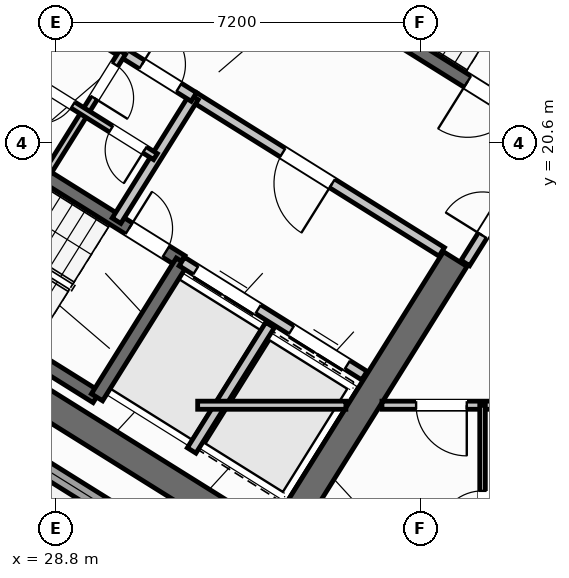
"""IFC4 building model, lengths in metres.
Left out: names, types, materials, properties, quantities, classifications, styles, units other than length and angle.
Written with IfcOpenShell. Run it as: python <this file> out.ifc"""

import sys

from ifc_helpers import new_model, si_unit, direction, frame, frame_2d, origin, place, context, subcontext, project, spatial, rectangle, extrude, source, transform, mapped, element, fill, save


model = new_model("IFC4")
c1 = context("Model", 3, precision=1e-05, world=origin(), true_north=direction((0.0, 1.0)))
c2 = subcontext(c1, "Body", "Model", "MODEL_VIEW")
j1 = project(units=[si_unit("LENGTHUNIT", "METRE"), si_unit("PLANEANGLEUNIT", "RADIAN")], contexts=[c1])
p1 = place(None, origin())
s1 = spatial("IfcSite", under=j1, at=p1, CompositionType="ELEMENT")
p2 = place(p1, origin())
s2 = spatial("IfcBuilding", under=s1, at=p2, CompositionType="ELEMENT")
p3 = place(p2, frame((0.0, 0.0, 179.4)))
s3 = spatial("IfcBuildingStorey", under=s2, at=p3, CompositionType="ELEMENT", Elevation=179.4)
p4 = place(p3, frame((33.366, 12.477, 0.0), z_axis=(0.0, 0.0, 1.0), x_axis=(-0.848047359947, 0.529920442413, 0.0)))
e1 = element("IfcWall", 1, at=p4, inside=s3, PredefinedType="SHEAR", context=c2, shape_type="SweptSolid", body=[
    extrude(rectangle(XDim=13.14, YDim=0.55, at=frame_2d((6.57, 0.0))), origin(), (0.0, 0.0, 1.0), 4.55),
])
p5 = place(p3, frame((36.683, 18.304, 0.0), z_axis=(0.0, 0.0, 1.0), x_axis=(-0.529896466841, -0.848062341122, 0.0)))
e2 = element("IfcWall", 2, at=p5, inside=s3, PredefinedType="SHEAR", context=c2, shape_type="SweptSolid", body=[
    extrude(rectangle(XDim=6.425, YDim=0.55, at=frame_2d((3.212, 0.0))), origin(), (0.0, 0.0, 1.0), 4.55),
])
p6 = place(p3, frame((31.76, 12.183, 0.0), z_axis=(0.0, 0.0, 1.0), x_axis=(-0.848047074256, 0.529920899612, 0.0)))
e3 = element("IfcWall", 3, at=p6, inside=s3, PredefinedType="STANDARD", context=c2, shape_type="SweptSolid", body=[
    extrude(rectangle(XDim=30.652, YDim=0.32, at=frame_2d((15.326, 0.0))), origin(), (0.0, 0.0, 1.0), 4.55),
])
p7 = place(p6, frame((21.52, 0.0, 0.0)))
e4 = element("IfcOpeningElement", 4, at=p7, cuts=e3, PredefinedType="OPENING", context=c2, shape_type="SweptSolid", body=[
    extrude(rectangle(XDim=1.2, YDim=2.15, at=frame_2d((0.6, 1.075))), frame((0.0, 0.17, 0.0), z_axis=(0.0, -1.0, 0.0), x_axis=(1.0, 0.0, 0.0)), (0.0, 0.0, 1.0), 0.34),
])
p8 = place(p6, frame((14.878, 0.0, 0.0)))
e5 = element("IfcOpeningElement", 5, at=p8, cuts=e3, PredefinedType="OPENING", context=c2, shape_type="SweptSolid", body=[
    extrude(rectangle(XDim=1.5, YDim=2.25, at=frame_2d((0.75, 1.125))), frame((0.0, 0.17, 0.0), z_axis=(0.0, -1.0, 0.0), x_axis=(1.0, 0.0, 0.0)), (0.0, 0.0, 1.0), 0.34),
])
p9 = place(p6, frame((1.865, 0.0, 0.75)))
e6 = element("IfcOpeningElement", 6, at=p9, cuts=e3, PredefinedType="OPENING", context=c2, shape_type="SweptSolid", body=[
    extrude(rectangle(XDim=2.4, YDim=1.6, at=frame_2d((1.2, 0.8))), frame((0.0, 0.17, 0.0), z_axis=(0.0, -1.0, 0.0), x_axis=(1.0, 0.0, 0.0)), (0.0, 0.0, 1.0), 0.34),
])
p10 = place(p6, frame((7.094, 0.0, 0.75)))
e7 = element("IfcOpeningElement", 7, at=p10, cuts=e3, PredefinedType="OPENING", context=c2, shape_type="SweptSolid", body=[
    extrude(rectangle(XDim=2.4, YDim=1.6, at=frame_2d((1.2, 0.8))), frame((0.0, 0.17, 0.0), z_axis=(0.0, -1.0, 0.0), x_axis=(1.0, 0.0, 0.0)), (0.0, 0.0, 1.0), 0.34),
])
p11 = place(p6, frame((19.404, 0.0, 0.95)))
e8 = element("IfcOpeningElement", 8, at=p11, cuts=e3, PredefinedType="OPENING", context=c2, shape_type="SweptSolid", body=[
    extrude(rectangle(XDim=1.2, YDim=1.4, at=frame_2d((0.6, 0.7))), frame((0.0, 0.17, 0.0), z_axis=(0.0, -1.0, 0.0), x_axis=(1.0, 0.0, 0.0)), (0.0, 0.0, 1.0), 0.34),
])
p12 = place(p6, frame((26.458, 0.0, 0.75)))
e9 = element("IfcOpeningElement", 9, at=p12, cuts=e3, PredefinedType="OPENING", context=c2, shape_type="SweptSolid", body=[
    extrude(rectangle(XDim=2.4, YDim=1.6, at=frame_2d((1.2, 0.8))), frame((0.0, 0.17, 0.0), z_axis=(0.0, -1.0, 0.0), x_axis=(1.0, 0.0, 0.0)), (0.0, 0.0, 1.0), 0.34),
])
p13 = place(p3, frame((29.605, 15.581, 0.0), z_axis=(0.0, 0.0, 1.0), x_axis=(-0.848036911448, 0.529937163087, 0.0)))
e10 = element("IfcWall", 10, at=p13, inside=s3, PredefinedType="SHEAR", context=c2, shape_type="SweptSolid", body=[
    extrude(rectangle(XDim=7.46, YDim=0.26, at=frame_2d((3.73, 0.0))), origin(), (0.0, 0.0, 1.0), 4.55),
])
p14 = place(p3, frame((31.28, 18.261, 0.0), z_axis=(0.0, 0.0, 1.0), x_axis=(-0.848051618787, 0.529913626805, 0.0)))
e11 = element("IfcWall", 11, at=p14, inside=s3, PredefinedType="SHEAR", context=c2, shape_type="SweptSolid", body=[
    extrude(rectangle(XDim=7.46, YDim=0.26, at=frame_2d((3.73, 0.0))), origin(), (0.0, 0.0, 1.0), 4.55),
])
p15 = place(p14, frame((0.36, 0.0, 0.0)))
e12 = element("IfcOpeningElement", 12, at=p15, cuts=e11, PredefinedType="OPENING", context=c2, shape_type="SweptSolid", body=[
    extrude(rectangle(XDim=0.86, YDim=2.05, at=frame_2d((0.43, 1.025))), frame((0.0, 0.14, 0.0), z_axis=(0.0, -1.0, 0.0), x_axis=(1.0, 0.0, 0.0)), (0.0, 0.0, 1.0), 0.28),
])
p16 = place(p3, frame((31.288, 18.256, 0.0), z_axis=(0.0, 0.0, 1.0), x_axis=(-0.529943379326, -0.848033026897, 0.0)))
e13 = element("IfcWall", 13, at=p16, inside=s3, PredefinedType="SHEAR", context=c2, shape_type="SweptSolid", body=[
    extrude(rectangle(XDim=3.16, YDim=0.26, at=frame_2d((1.58, 0.0))), origin(), (0.0, 0.0, 1.0), 4.55),
])
p17 = place(p3, frame((38.046, 21.108, 0.0), z_axis=(0.0, 0.0, 1.0), x_axis=(-0.848054434086, 0.529909121291, 0.0)))
e14 = element("IfcWall", 14, at=p17, inside=s3, PredefinedType="SHEAR", context=c2, shape_type="SweptSolid", body=[
    extrude(rectangle(XDim=7.33, YDim=0.26, at=frame_2d((3.665, 0.0))), origin(), (0.0, 0.0, 1.0), 4.55),
])
p18 = place(p17, frame((0.22, 0.0, 0.0)))
e15 = element("IfcOpeningElement", 15, at=p18, cuts=e14, PredefinedType="OPENING", context=c2, shape_type="SweptSolid", body=[
    extrude(rectangle(XDim=1.1, YDim=2.1, at=frame_2d((0.55, 1.05))), frame((0.0, 0.14, 0.0), z_axis=(0.0, -1.0, 0.0), x_axis=(1.0, 0.0, 0.0)), (0.0, 0.0, 1.0), 0.28),
])
p19 = place(p3, frame((34.891, 16.005, 0.0), z_axis=(0.0, 0.0, 1.0), x_axis=(-0.848062873452, 0.529895614884, 0.0)))
e16 = element("IfcWall", 16, at=p19, inside=s3, PredefinedType="STANDARD", context=c2, shape_type="SweptSolid", body=[
    extrude(rectangle(XDim=4.248, YDim=0.2, at=frame_2d((2.124, 0.0))), origin(), (0.0, 0.0, 1.0), 4.54),
])
p20 = place(p19, frame((0.398, 0.0, 0.0)))
e17 = element("IfcOpeningElement", 17, at=p20, cuts=e16, PredefinedType="OPENING", context=c2, shape_type="SweptSolid", body=[
    extrude(rectangle(XDim=1.3, YDim=2.2, at=frame_2d((0.65, 1.1))), frame((0.0, 0.11, 0.0), z_axis=(0.0, -1.0, 0.0), x_axis=(1.0, 0.0, 0.0)), (0.0, 0.0, 1.0), 0.22),
])
p21 = place(p19, frame((2.473, 0.0, 0.0)))
e18 = element("IfcOpeningElement", 18, at=p21, cuts=e16, PredefinedType="OPENING", context=c2, shape_type="SweptSolid", body=[
    extrude(rectangle(XDim=1.45, YDim=2.25, at=frame_2d((0.725, 1.125))), frame((0.0, 0.11, 0.0), z_axis=(0.0, -1.0, 0.0), x_axis=(1.0, 0.0, 0.0)), (0.0, 0.0, 1.0), 0.22),
])
p22 = place(p3, frame((36.417, 18.447, 0.0), z_axis=(0.0, 0.0, 1.0), x_axis=(-0.848064879198, 0.529892404805, 0.0)))
e19 = element("IfcWall", 19, at=p22, inside=s3, PredefinedType="STANDARD", context=c2, shape_type="SweptSolid", body=[
    extrude(rectangle(XDim=5.768, YDim=0.2, at=frame_2d((2.884, 0.0))), origin(), (0.0, 0.0, 1.0), 4.54),
])
p23 = place(p22, frame((2.548, 0.0, 0.0)))
e20 = element("IfcOpeningElement", 20, at=p23, cuts=e19, PredefinedType="OPENING", context=c2, shape_type="SweptSolid", body=[
    extrude(rectangle(XDim=1.15, YDim=2.1, at=frame_2d((0.575, 1.05))), frame((0.0, 0.11, 0.0), z_axis=(0.0, -1.0, 0.0), x_axis=(1.0, 0.0, 0.0)), (0.0, 0.0, 1.0), 0.22),
])
p24 = place(p3, frame((33.029, 17.003, 0.0), z_axis=(0.0, 0.0, 1.0), x_axis=(-0.529916267533, -0.848049968695, 0.0)))
e21 = element("IfcWall", 21, at=p24, inside=s3, PredefinedType="STANDARD", context=c2, shape_type="SweptSolid", body=[
    extrude(rectangle(XDim=2.92, YDim=0.2, at=frame_2d((1.46, 0.0))), origin(), (0.0, 0.0, 1.0), 4.54),
])
for number, where, z_axis, x_axis in (
    (22, (31.525, 21.504, 0.0), (0.0, 0.0, 1.0), (-0.53, -0.848, 0.0)),
    (23, (28.71, 23.263, 0.0), (0.0, 0.0, 1.0), (-0.53, -0.848, 0.0)),
):
    element("IfcWall", number, at=place(p3, frame(where, z_axis=z_axis, x_axis=x_axis)), inside=s3, PredefinedType="STANDARD", context=c2, shape_type="SweptSolid", body=[
        extrude(rectangle(XDim=2.88, YDim=0.2, at=frame_2d((1.44, 0.0))), origin(), (0.0, 0.0, 1.0), 4.54),
    ])
p25 = place(p3, frame((31.525, 21.504, 0.0), z_axis=(0.0, 0.0, 1.0), x_axis=(-0.848040211232, 0.529931882541, 0.0)))
e24 = element("IfcWall", 24, at=p25, inside=s3, PredefinedType="STANDARD", context=c2, shape_type="SweptSolid", body=[
    extrude(rectangle(XDim=6.218, YDim=0.2, at=frame_2d((3.109, 0.0))), origin(), (0.0, 0.0, 1.0), 4.54),
])
p26 = place(p25, frame((4.4, 0.0, 0.0)))
e25 = element("IfcOpeningElement", 25, at=p26, cuts=e24, PredefinedType="OPENING", context=c2, shape_type="SweptSolid", body=[
    extrude(rectangle(XDim=0.86, YDim=2.05, at=frame_2d((0.43, 1.025))), frame((0.0, 0.11, 0.0), z_axis=(0.0, -1.0, 0.0), x_axis=(1.0, 0.0, 0.0)), (0.0, 0.0, 1.0), 0.22),
])
p27 = place(p25, frame((0.35, 0.0, 0.0)))
e26 = element("IfcOpeningElement", 26, at=p27, cuts=e24, PredefinedType="OPENING", context=c2, shape_type="SweptSolid", body=[
    extrude(rectangle(XDim=0.86, YDim=2.05, at=frame_2d((0.43, 1.025))), frame((0.0, 0.11, 0.0), z_axis=(0.0, -1.0, 0.0), x_axis=(1.0, 0.0, 0.0)), (0.0, 0.0, 1.0), 0.22),
])
p28 = place(p3, frame((30.117, 22.384, 0.0), z_axis=(0.0, 0.0, 1.0), x_axis=(-0.529951914384, -0.848027693204, 0.0)))
e27 = element("IfcWall", 27, at=p28, inside=s3, PredefinedType="PLUMBINGWALL", context=c2, shape_type="SweptSolid", body=[
    extrude(rectangle(XDim=1.4, YDim=0.14, at=frame_2d((0.7, 0.0))), origin(), (0.0, 0.0, 1.0), 4.54),
])
p29 = place(p28, frame((0.28, 0.0, 0.0)))
e28 = element("IfcOpeningElement", 28, at=p29, cuts=e27, PredefinedType="OPENING", context=c2, shape_type="SweptSolid", body=[
    extrude(rectangle(XDim=0.78, YDim=2.05, at=frame_2d((0.39, 1.025))), frame((0.0, 0.08, 0.0), z_axis=(0.0, -1.0, 0.0), x_axis=(1.0, 0.0, 0.0)), (0.0, 0.0, 1.0), 0.16),
])
p30 = place(p3, frame((29.375, 21.196, 0.0), z_axis=(0.0, 0.0, 1.0), x_axis=(-0.529865479138, -0.848081702443, 0.0)))
e29 = element("IfcWall", 29, at=p30, inside=s3, PredefinedType="PLUMBINGWALL", context=c2, shape_type="SweptSolid", body=[
    extrude(rectangle(XDim=1.48, YDim=0.14, at=frame_2d((0.74, 0.0))), origin(), (0.0, 0.0, 1.0), 4.54),
])
p31 = place(p3, frame((30.766, 20.327, 0.0), z_axis=(0.0, 0.0, 1.0), x_axis=(-0.848052663127, 0.529911955482, 0.0)))
e30 = element("IfcWall", 30, at=p31, inside=s3, PredefinedType="PLUMBINGWALL", context=c2, shape_type="SweptSolid", body=[
    extrude(rectangle(XDim=3.28, YDim=0.14, at=frame_2d((1.64, 0.0))), origin(), (0.0, 0.0, 1.0), 4.54),
])
p32 = place(p31, frame((0.25, 0.0, 0.0)))
e31 = element("IfcOpeningElement", 31, at=p32, cuts=e30, PredefinedType="OPENING", context=c2, shape_type="SweptSolid", body=[
    extrude(rectangle(XDim=0.78, YDim=2.05, at=frame_2d((0.39, 1.025))), frame((0.0, 0.08, 0.0), z_axis=(0.0, -1.0, 0.0), x_axis=(1.0, 0.0, 0.0)), (0.0, 0.0, 1.0), 0.16),
])
p33 = place(p31, frame((1.92, 0.0, 0.0)))
e32 = element("IfcOpeningElement", 32, at=p33, cuts=e30, PredefinedType="OPENING", context=c2, shape_type="SweptSolid", body=[
    extrude(rectangle(XDim=0.78, YDim=2.05, at=frame_2d((0.39, 1.025))), frame((0.0, 0.08, 0.0), z_axis=(0.0, -1.0, 0.0), x_axis=(1.0, 0.0, 0.0)), (0.0, 0.0, 1.0), 0.16),
])
p34 = place(p3, frame((38.451, 20.737, 0.0), z_axis=(0.0, 0.0, 1.0), x_axis=(-0.529924799939, -0.848044637038, 0.0)))
e33 = element("IfcWall", 33, at=p34, inside=s3, PredefinedType="STANDARD", context=c2, shape_type="SweptSolid", body=[
    extrude(rectangle(XDim=2.96, YDim=0.2, at=frame_2d((1.48, 0.0))), origin(), (0.0, 0.0, 1.0), 4.54),
])
p35 = place(p34, frame((1.46, 0.0, 0.0)))
e34 = element("IfcOpeningElement", 34, at=p35, cuts=e33, PredefinedType="OPENING", context=c2, shape_type="SweptSolid", body=[
    extrude(rectangle(XDim=0.86, YDim=2.05, at=frame_2d((0.43, 1.025))), frame((0.0, 0.11, 0.0), z_axis=(0.0, -1.0, 0.0), x_axis=(1.0, 0.0, 0.0)), (0.0, 0.0, 1.0), 0.22),
])
p36 = place(p3, frame((31.6, 15.42, 0.0), z_axis=(0.0, 0.0, 1.0), x_axis=(1.0, 0.0, 0.0)))
e35 = element("IfcWall", 35, at=p36, inside=s3, PredefinedType="PARTITIONING", context=c2, shape_type="SweptSolid", body=[
    extrude(rectangle(XDim=2.925, YDim=0.16, at=frame_2d((1.462, 0.0))), origin(), (0.0, 0.0, 1.0), 4.54),
])
p37 = place(p3, frame((35.237, 15.42, 0.0), z_axis=(0.0, 0.0, 1.0), x_axis=(1.0, 0.0, 0.0)))
e36 = element("IfcWall", 36, at=p37, inside=s3, PredefinedType="PARTITIONING", context=c2, shape_type="SweptSolid", body=[
    extrude(rectangle(XDim=15.432, YDim=0.16, at=frame_2d((7.716, 0.0))), origin(), (0.0, 0.0, 1.0), 4.54),
])
p38 = place(p37, frame((0.674, 0.0, 0.0)))
e37 = element("IfcOpeningElement", 37, at=p38, cuts=e36, PredefinedType="OPENING", context=c2, shape_type="SweptSolid", body=[
    extrude(rectangle(XDim=1.0, YDim=2.1, at=frame_2d((0.5, 1.05))), frame((0.0, 0.09, 0.0), z_axis=(0.0, -1.0, 0.0), x_axis=(1.0, 0.0, 0.0)), (0.0, 0.0, 1.0), 0.18),
])
p39 = place(p37, frame((9.094, 0.0, 0.0)))
e38 = element("IfcOpeningElement", 38, at=p39, cuts=e36, PredefinedType="OPENING", context=c2, shape_type="SweptSolid", body=[
    extrude(rectangle(XDim=1.0, YDim=2.1, at=frame_2d((0.5, 1.05))), frame((0.0, 0.09, 0.0), z_axis=(0.0, -1.0, 0.0), x_axis=(1.0, 0.0, 0.0)), (0.0, 0.0, 1.0), 0.18),
])
p40 = place(p3, frame((37.222, 1.96, 0.0), z_axis=(0.0, 0.0, 1.0), x_axis=(0.0, 1.0, 0.0)))
e39 = element("IfcWall", 39, at=p40, inside=s3, PredefinedType="PARTITIONING", context=c2, shape_type="SweptSolid", body=[
    extrude(rectangle(XDim=13.46, YDim=0.11, at=frame_2d((6.73, 0.0))), origin(), (0.0, 0.0, 1.0), 4.54),
])
p41 = place(p40, frame((5.2, 0.0, 0.0)))
e40 = element("IfcOpeningElement", 40, at=p41, cuts=e39, PredefinedType="OPENING", context=c2, shape_type="SweptSolid", body=[
    extrude(rectangle(XDim=0.92, YDim=2.08, at=frame_2d((0.46, 1.04))), frame((0.0, 0.065, 0.0), z_axis=(0.0, -1.0, 0.0), x_axis=(1.0, 0.0, 0.0)), (0.0, 0.0, 1.0), 0.13),
])
p42 = place(p40, frame((10.89, 0.0, 0.0)))
e41 = element("IfcOpeningElement", 41, at=p42, cuts=e39, PredefinedType="OPENING", context=c2, shape_type="SweptSolid", body=[
    extrude(rectangle(XDim=0.88, YDim=2.08, at=frame_2d((0.44, 1.04))), frame((0.0, 0.065, 0.0), z_axis=(0.0, -1.0, 0.0), x_axis=(1.0, 0.0, 0.0)), (0.0, 0.0, 1.0), 0.13),
])
m1 = source(origin(), c2, "Body", "SweptSolid", [
    extrude(rectangle(XDim=2.4, YDim=1.6, at=frame_2d((1.2, 0.8))), frame((0.0, 0.03, 0.0), z_axis=(0.0, -1.0, 0.0), x_axis=(1.0, 0.0, 0.0)), (0.0, 0.0, 1.0), 0.06),
])
p43 = place(p9, origin())
e42 = element("IfcWindow", 42, at=p43, inside=s3, PartitioningType="SINGLE_PANEL", PredefinedType="WINDOW", context=c2, shape_type="MappedRepresentation", body=[
    mapped(m1, transform((0.0, 0.0, 0.0), scale=1.0)),
])
fill(e6, e42)
m2 = source(origin(), c2, "Body", "SweptSolid", [
    extrude(rectangle(XDim=0.86, YDim=2.05, at=frame_2d((0.43, 1.025))), frame((0.0, 0.025, 0.0), z_axis=(0.0, -1.0, 0.0), x_axis=(1.0, 0.0, 0.0)), (0.0, 0.0, 1.0), 0.05),
])
p44 = place(p15, frame((0.86, 0.0, 0.0), z_axis=(0.0, 0.0, 1.0), x_axis=(-1.0, 0.0, 0.0)))
e43 = element("IfcDoor", 43, at=p44, inside=s3, OperationType="SINGLE_SWING_LEFT", PredefinedType="DOOR", context=c2, shape_type="MappedRepresentation", body=[
    mapped(m2, transform((0.0, 0.0, 0.0), scale=1.0)),
])
fill(e12, e43)
m3 = source(origin(), c2, "Body", "SweptSolid", [
    extrude(rectangle(XDim=1.1, YDim=2.1, at=frame_2d((0.55, 1.05))), frame((0.0, 0.025, 0.0), z_axis=(0.0, -1.0, 0.0), x_axis=(1.0, 0.0, 0.0)), (0.0, 0.0, 1.0), 0.05),
])
p45 = place(p18, origin())
e44 = element("IfcDoor", 44, at=p45, inside=s3, OperationType="SINGLE_SWING_RIGHT", PredefinedType="DOOR", context=c2, shape_type="MappedRepresentation", body=[
    mapped(m3, transform((0.0, 0.0, 0.0), scale=1.0)),
])
fill(e15, e44)
m4 = source(origin(), c2, "Body", "SweptSolid", [
    extrude(rectangle(XDim=1.15, YDim=2.1, at=frame_2d((0.575, 1.05))), frame((0.0, 0.025, 0.0), z_axis=(0.0, -1.0, 0.0), x_axis=(1.0, 0.0, 0.0)), (0.0, 0.0, 1.0), 0.05),
])
p46 = place(p23, origin())
e45 = element("IfcDoor", 45, at=p46, inside=s3, OperationType="SINGLE_SWING_LEFT", PredefinedType="DOOR", context=c2, shape_type="MappedRepresentation", body=[
    mapped(m4, transform((0.0, 0.0, 0.0), scale=1.0)),
])
fill(e20, e45)
m5 = source(origin(), c2, "Body", "SweptSolid", [
    extrude(rectangle(XDim=1.3, YDim=2.2, at=frame_2d((0.65, 1.1))), frame((0.0, 0.025, 0.0), z_axis=(0.0, -1.0, 0.0), x_axis=(1.0, 0.0, 0.0)), (0.0, 0.0, 1.0), 0.05),
])
p47 = place(p20, origin())
e46 = element("IfcDoor", 46, at=p47, inside=s3, OperationType="DOUBLE_DOOR_SLIDING", PredefinedType="DOOR", context=c2, shape_type="MappedRepresentation", body=[
    mapped(m5, transform((0.0, 0.0, 0.0), scale=1.0)),
])
fill(e17, e46)
m6 = source(origin(), c2, "Body", "SweptSolid", [
    extrude(rectangle(XDim=1.45, YDim=2.25, at=frame_2d((0.725, 1.125))), frame((0.0, 0.025, 0.0), z_axis=(0.0, -1.0, 0.0), x_axis=(1.0, 0.0, 0.0)), (0.0, 0.0, 1.0), 0.05),
])
p48 = place(p21, origin())
e47 = element("IfcDoor", 47, at=p48, inside=s3, OperationType="DOUBLE_DOOR_SLIDING", PredefinedType="DOOR", context=c2, shape_type="MappedRepresentation", body=[
    mapped(m6, transform((0.0, 0.0, 0.0), scale=1.0)),
])
fill(e18, e47)
p49 = place(p27, frame((0.86, 0.0, 0.0), z_axis=(0.0, 0.0, 1.0), x_axis=(-1.0, 0.0, 0.0)))
e48 = element("IfcDoor", 48, at=p49, inside=s3, OperationType="SINGLE_SWING_LEFT", PredefinedType="DOOR", context=c2, shape_type="MappedRepresentation", body=[
    mapped(m2, transform((0.0, 0.0, 0.0), scale=1.0)),
])
fill(e26, e48)
m7 = source(origin(), c2, "Body", "SweptSolid", [
    extrude(rectangle(XDim=0.78, YDim=2.05, at=frame_2d((0.39, 1.025))), frame((0.0, 0.025, 0.0), z_axis=(0.0, -1.0, 0.0), x_axis=(1.0, 0.0, 0.0)), (0.0, 0.0, 1.0), 0.05),
])
p50 = place(p29, origin())
e49 = element("IfcDoor", 49, at=p50, inside=s3, OperationType="SINGLE_SWING_RIGHT", PredefinedType="DOOR", context=c2, shape_type="MappedRepresentation", body=[
    mapped(m7, transform((0.0, 0.0, 0.0), scale=1.0)),
])
fill(e28, e49)
p51 = place(p32, origin())
e50 = element("IfcDoor", 50, at=p51, inside=s3, OperationType="SINGLE_SWING_LEFT", PredefinedType="DOOR", context=c2, shape_type="MappedRepresentation", body=[
    mapped(m7, transform((0.0, 0.0, 0.0), scale=1.0)),
])
fill(e31, e50)
p52 = place(p33, origin())
e51 = element("IfcDoor", 51, at=p52, inside=s3, OperationType="SINGLE_SWING_RIGHT", PredefinedType="DOOR", context=c2, shape_type="MappedRepresentation", body=[
    mapped(m7, transform((0.0, 0.0, 0.0), scale=1.0)),
])
fill(e32, e51)
p53 = place(p35, frame((0.86, 0.0, 0.0), z_axis=(0.0, 0.0, 1.0), x_axis=(-1.0, 0.0, 0.0)))
e52 = element("IfcDoor", 52, at=p53, inside=s3, OperationType="SINGLE_SWING_LEFT", PredefinedType="DOOR", context=c2, shape_type="MappedRepresentation", body=[
    mapped(m2, transform((0.0, 0.0, 0.0), scale=1.0)),
])
fill(e34, e52)
m8 = source(origin(), c2, "Body", "SweptSolid", [
    extrude(rectangle(XDim=1.0, YDim=2.1, at=frame_2d((0.5, 1.05))), frame((0.0, 0.025, 0.0), z_axis=(0.0, -1.0, 0.0), x_axis=(1.0, 0.0, 0.0)), (0.0, 0.0, 1.0), 0.05),
])
p54 = place(p38, frame((1.0, 0.0, 0.0), z_axis=(0.0, 0.0, 1.0), x_axis=(-1.0, 0.0, 0.0)))
e53 = element("IfcDoor", 53, at=p54, inside=s3, OperationType="SINGLE_SWING_LEFT", PredefinedType="DOOR", context=c2, shape_type="MappedRepresentation", body=[
    mapped(m8, transform((0.0, 0.0, 0.0), scale=1.0)),
])
fill(e37, e53)
m9 = source(origin(), c2, "Body", "SweptSolid", [
    extrude(rectangle(XDim=0.88, YDim=2.08, at=frame_2d((0.44, 1.04))), frame((0.0, 0.025, 0.0), z_axis=(0.0, -1.0, 0.0), x_axis=(1.0, 0.0, 0.0)), (0.0, 0.0, 1.0), 0.05),
])
p55 = place(p42, origin())
e54 = element("IfcDoor", 54, at=p55, inside=s3, OperationType="SINGLE_SWING_LEFT", PredefinedType="DOOR", context=c2, shape_type="MappedRepresentation", body=[
    mapped(m9, transform((0.0, 0.0, 0.0), scale=1.0)),
])
fill(e41, e54)
save(model, sys.argv[1])
